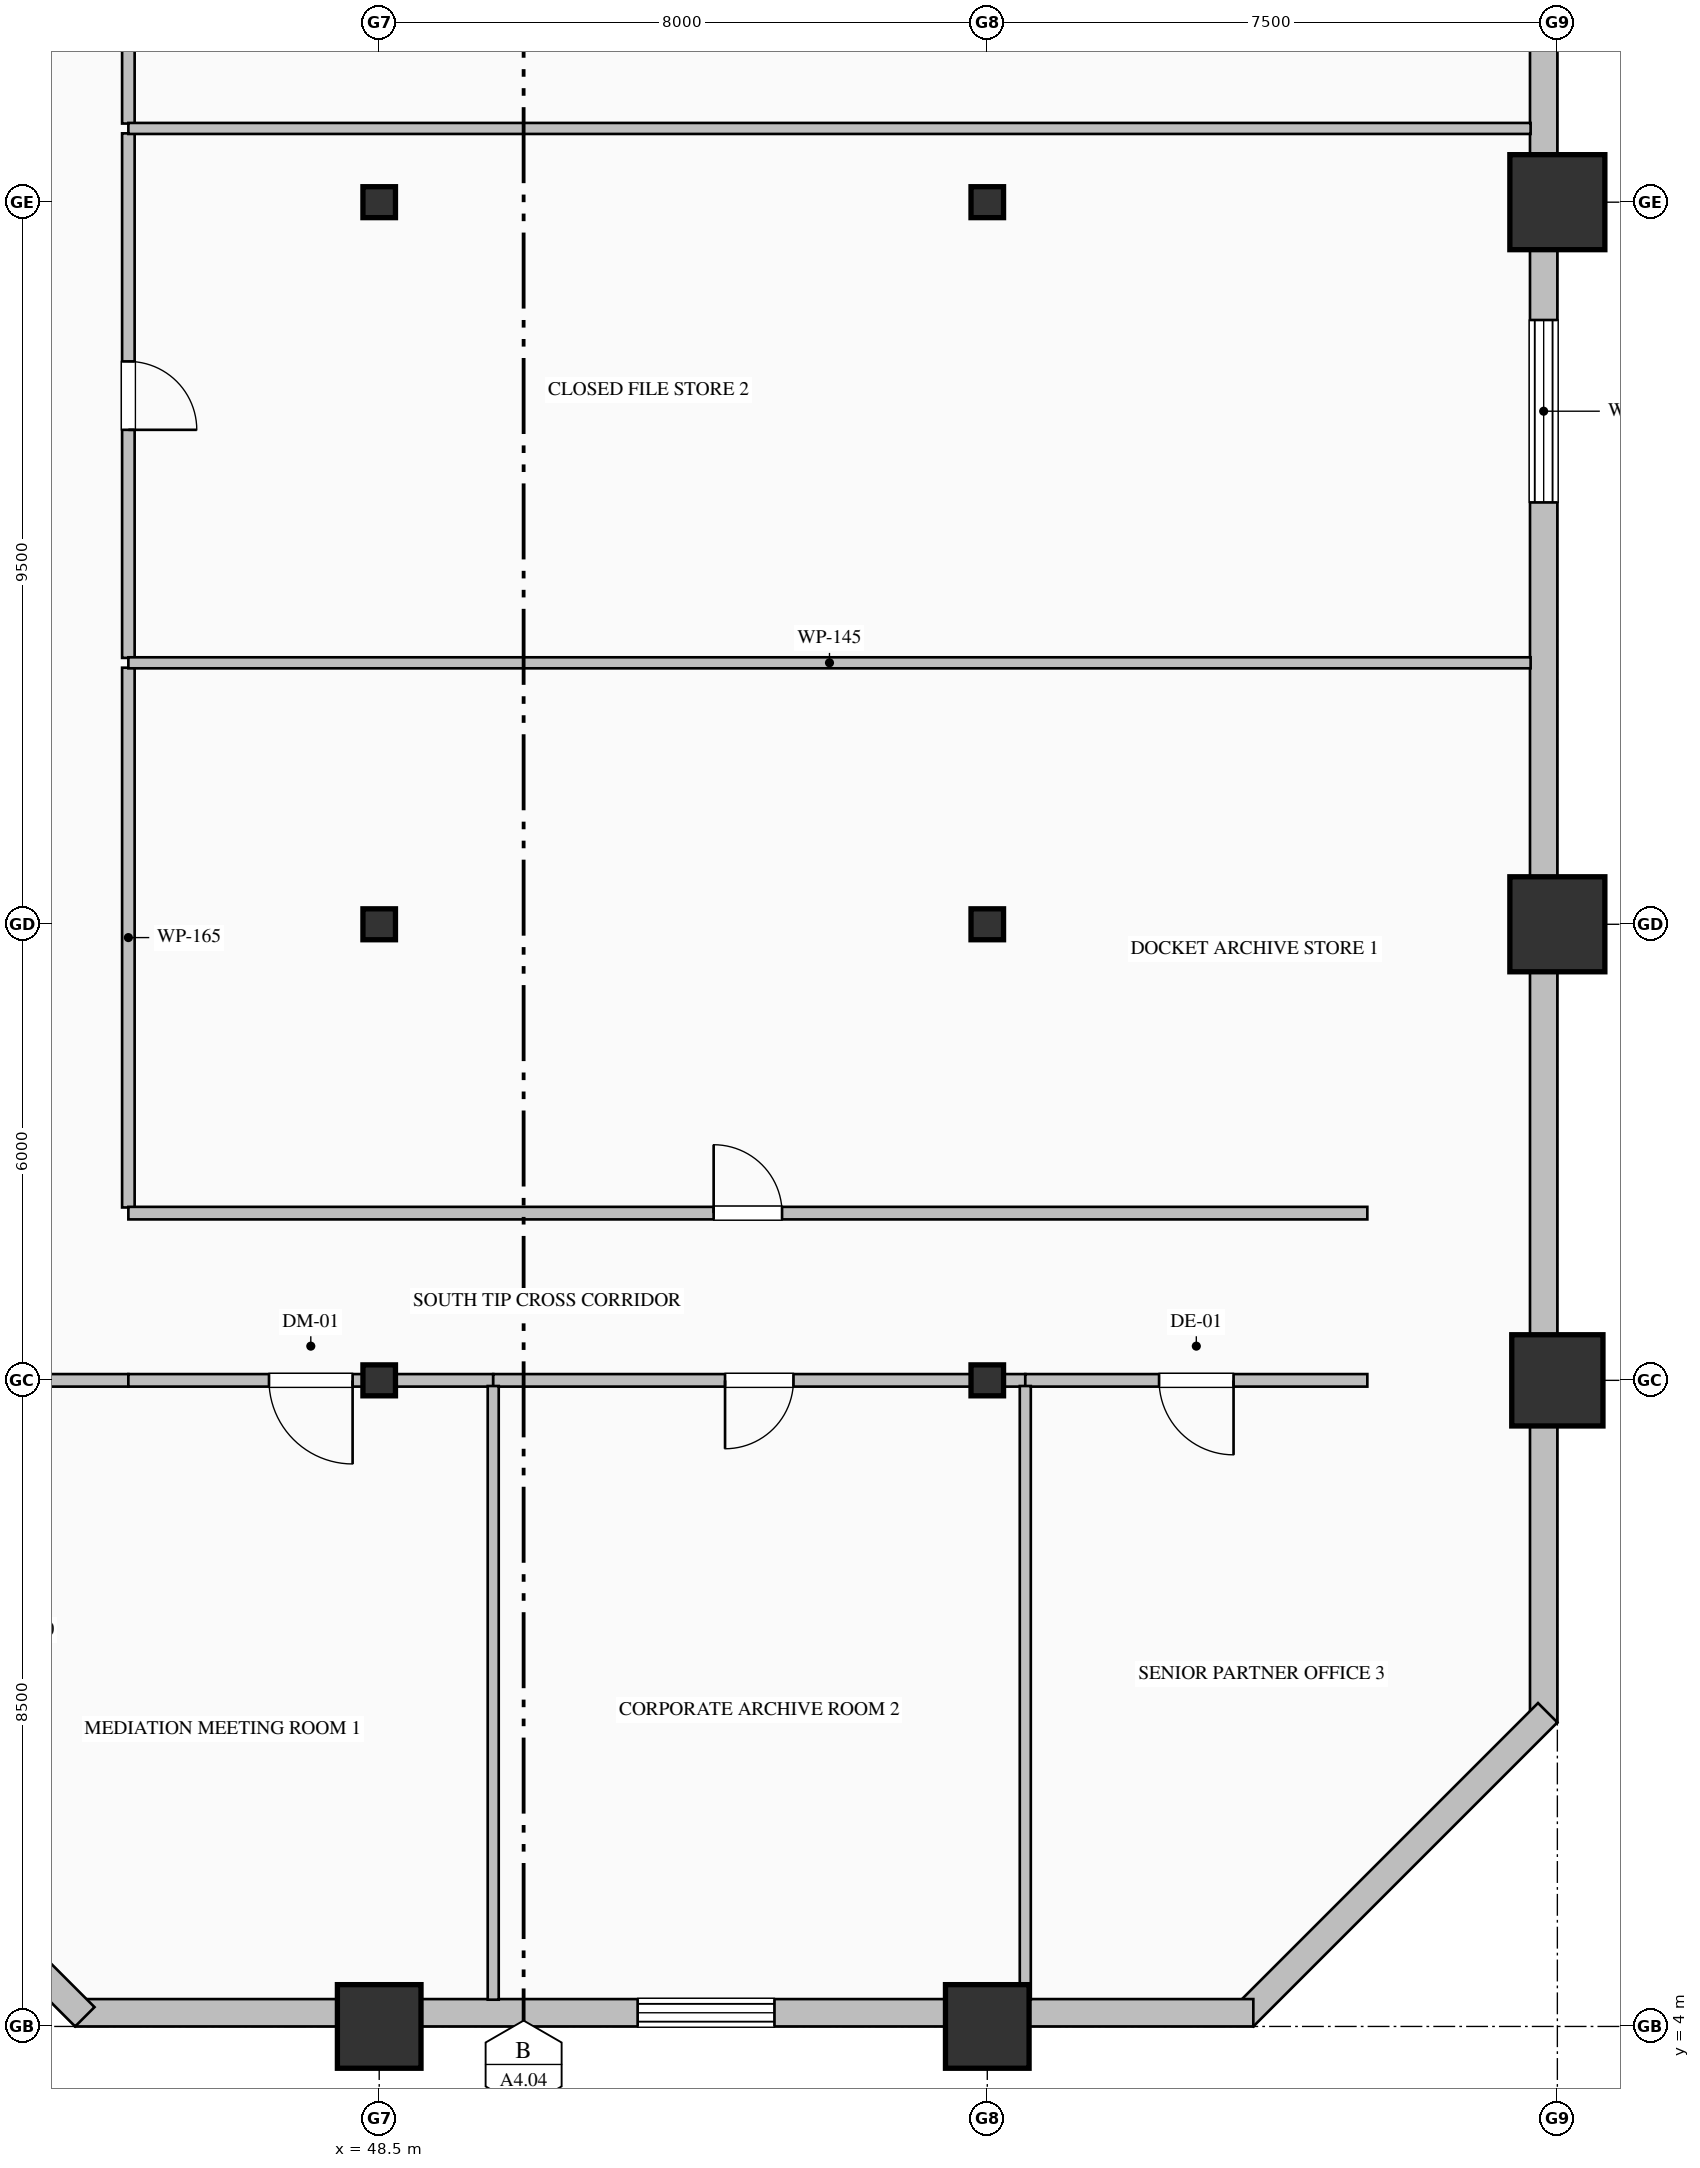
"""IFC4 building model, lengths in metres.
Left out: names, types, materials, properties, quantities, classifications, styles, units other than length and angle.
Written with IfcOpenShell. Run it as: python <this file> out.ifc"""

import sys

from ifc_helpers import new_model, si_unit, direction, frame, frame_2d, origin, origin_2d, place, context, subcontext, project, spatial, rectangle, hollow_rectangle, hollow_circle, i_section, extrude, element, fill, save


model = new_model("IFC4")
c1 = context("Model", 3, precision=1e-05, world=origin(), true_north=direction((0.0, 1.0)))
c2 = subcontext(c1, "Body", "Model", "MODEL_VIEW")
j1 = project(units=[si_unit("LENGTHUNIT", "METRE"), si_unit("PLANEANGLEUNIT", "RADIAN")], contexts=[c1])
p1 = place(None, origin())
s1 = spatial("IfcSite", under=j1, at=p1, CompositionType="ELEMENT")
p2 = place(p1, origin())
s2 = spatial("IfcBuilding", under=s1, at=p2, CompositionType="ELEMENT")
p3 = place(p2, frame((0.0, 0.0, 100.2)))
s3 = spatial("IfcBuildingStorey", under=s2, at=p3, CompositionType="ELEMENT", Elevation=100.2)
p4 = place(p3, frame((48.5, 4.0, 0.0), z_axis=(0.0, 0.0, 1.0), x_axis=(1.0, 0.0, 0.0)))
e1 = element("IfcColumn", 1, at=p4, inside=s3, PredefinedType="COLUMN", context=c2, shape_type="SweptSolid", body=[
    extrude(hollow_rectangle(XDim=1.1, YDim=1.1, WallThickness=0.04, at=origin_2d()), origin(), (0.0, 0.0, 1.0), 4.0),
])
for number, where, z_axis, x_axis in (
    (2, (48.5, 12.5, 0.0), (0.0, 0.0, 1.0), (1.0, 0.0, 0.0)),
    (3, (48.5, 18.5, 0.0), (0.0, 0.0, 1.0), (1.0, 0.0, 0.0)),
    (4, (48.5, 28.0, 0.0), (0.0, 0.0, 1.0), (1.0, 0.0, 0.0)),
):
    element("IfcColumn", number, at=place(p3, frame(where, z_axis=z_axis, x_axis=x_axis)), inside=s3, PredefinedType="COLUMN", context=c2, shape_type="SweptSolid", body=[
        extrude(i_section(OverallWidth=0.407, OverallDepth=0.428, WebThickness=0.02, FlangeThickness=0.035, FilletRadius=0.022, at=origin_2d()), origin(), (0.0, 0.0, 1.0), 4.0),
    ])
p5 = place(p3, frame((56.5, 4.0, 0.0), z_axis=(0.0, 0.0, 1.0), x_axis=(1.0, 0.0, 0.0)))
e5 = element("IfcColumn", 5, at=p5, inside=s3, PredefinedType="COLUMN", context=c2, shape_type="SweptSolid", body=[
    extrude(hollow_rectangle(XDim=1.1, YDim=1.1, WallThickness=0.04, at=origin_2d()), origin(), (0.0, 0.0, 1.0), 4.0),
])
for number, where, z_axis, x_axis in (
    (6, (56.5, 12.5, 0.0), (0.0, 0.0, 1.0), (1.0, 0.0, 0.0)),
    (7, (56.5, 18.5, 0.0), (0.0, 0.0, 1.0), (1.0, 0.0, 0.0)),
    (8, (56.5, 28.0, 0.0), (0.0, 0.0, 1.0), (1.0, 0.0, 0.0)),
):
    element("IfcColumn", number, at=place(p3, frame(where, z_axis=z_axis, x_axis=x_axis)), inside=s3, PredefinedType="COLUMN", context=c2, shape_type="SweptSolid", body=[
        extrude(i_section(OverallWidth=0.407, OverallDepth=0.428, WebThickness=0.02, FlangeThickness=0.035, FilletRadius=0.022, at=origin_2d()), origin(), (0.0, 0.0, 1.0), 4.0),
    ])
p6 = place(p3, frame((64.0, 12.5, 0.0), z_axis=(0.0, 0.0, 1.0), x_axis=(1.0, 0.0, 0.0)))
e9 = element("IfcColumn", 9, at=p6, inside=s3, PredefinedType="COLUMN", context=c2, shape_type="SweptSolid", body=[
    extrude(hollow_circle(Radius=0.6, WallThickness=0.04, at=origin_2d()), origin(), (0.0, 0.0, 1.0), 4.0),
])
for number, where, z_axis, x_axis in (
    (10, (64.0, 18.5, 0.0), (0.0, 0.0, 1.0), (1.0, 0.0, 0.0)),
    (11, (64.0, 28.0, 0.0), (0.0, 0.0, 1.0), (1.0, 0.0, 0.0)),
):
    element("IfcColumn", number, at=place(p3, frame(where, z_axis=z_axis, x_axis=x_axis)), inside=s3, PredefinedType="COLUMN", context=c2, shape_type="SweptSolid", body=[
        extrude(hollow_rectangle(XDim=1.25, YDim=1.25, WallThickness=0.045, at=origin_2d()), origin(), (0.0, 0.0, 1.0), 4.0),
    ])
p7 = place(p3, frame((63.82, 36.05, 0.0), z_axis=(0.0, 0.0, 1.0), x_axis=(0.0, -1.0, 0.0)))
e12 = element("IfcWall", 12, at=p7, inside=s3, PredefinedType="SOLIDWALL", context=c2, shape_type="SweptSolid", body=[
    extrude(rectangle(XDim=28.05, YDim=0.36, at=frame_2d((14.025, 0.0))), origin(), (0.0, 0.0, 1.0), 3.25),
])
p8 = place(p7, frame((2.7, 0.0, 0.85)))
e13 = element("IfcOpeningElement", 13, at=p8, cuts=e12, PredefinedType="OPENING", context=c2, shape_type="SweptSolid", body=[
    extrude(rectangle(XDim=1.8, YDim=2.05, at=frame_2d((0.9, 1.025))), frame((0.0, 0.19, 0.0), z_axis=(0.0, -1.0, 0.0), x_axis=(1.0, 0.0, 0.0)), (0.0, 0.0, 1.0), 0.38),
])
p9 = place(p7, frame((9.6, 0.0, 0.8)))
e14 = element("IfcOpeningElement", 14, at=p9, cuts=e12, PredefinedType="OPENING", context=c2, shape_type="SweptSolid", body=[
    extrude(rectangle(XDim=2.4, YDim=2.15, at=frame_2d((1.2, 1.075))), frame((0.0, 0.19, 0.0), z_axis=(0.0, -1.0, 0.0), x_axis=(1.0, 0.0, 0.0)), (0.0, 0.0, 1.0), 0.38),
])
p10 = place(p3, frame((63.873, 8.127, 0.0), z_axis=(0.0, 0.0, 1.0), x_axis=(-0.707106781187, -0.707106781187, 0.0)))
e15 = element("IfcWall", 15, at=p10, inside=s3, PredefinedType="SOLIDWALL", context=c2, shape_type="SweptSolid", body=[
    extrude(rectangle(XDim=5.657, YDim=0.36, at=frame_2d((2.828, 0.0))), origin(), (0.0, 0.0, 1.0), 3.75),
])
p11 = place(p3, frame((60.0, 4.18, 0.0), z_axis=(0.0, 0.0, 1.0), x_axis=(-1.0, 0.0, 0.0)))
e16 = element("IfcWall", 16, at=p11, inside=s3, PredefinedType="SOLIDWALL", context=c2, shape_type="SweptSolid", body=[
    extrude(rectangle(XDim=15.5, YDim=0.36, at=frame_2d((7.75, 0.0))), origin(), (0.0, 0.0, 1.0), 3.25),
])
p12 = place(p11, frame((6.3, 0.0, 0.85)))
e17 = element("IfcOpeningElement", 17, at=p12, cuts=e16, PredefinedType="OPENING", context=c2, shape_type="SweptSolid", body=[
    extrude(rectangle(XDim=1.8, YDim=2.05, at=frame_2d((0.9, 1.025))), frame((0.0, 0.19, 0.0), z_axis=(0.0, -1.0, 0.0), x_axis=(1.0, 0.0, 0.0)), (0.0, 0.0, 1.0), 0.38),
])
p13 = place(p3, frame((44.627, 4.127, 0.0), z_axis=(0.0, 0.0, 1.0), x_axis=(-0.707106781187, 0.707106781187, 0.0)))
e18 = element("IfcWall", 18, at=p13, inside=s3, PredefinedType="SOLIDWALL", context=c2, shape_type="SweptSolid", body=[
    extrude(rectangle(XDim=5.657, YDim=0.36, at=frame_2d((2.828, 0.0))), origin(), (0.0, 0.0, 1.0), 3.75),
])
p14 = place(p3, frame((45.2, 21.875, 0.0), z_axis=(0.0, 0.0, 1.0), x_axis=(0.0, -1.0, 0.0)))
e19 = element("IfcWall", 19, at=p14, inside=s3, PredefinedType="PARTITIONING", context=c2, shape_type="SweptSolid", body=[
    extrude(rectangle(XDim=7.101, YDim=0.165, at=frame_2d((3.551, 0.0))), origin(), (0.0, 0.0, 1.0), 3.75),
])
p15 = place(p3, frame((45.2, 28.906, 0.0), z_axis=(0.0, 0.0, 1.0), x_axis=(0.0, -1.0, 0.0)))
e20 = element("IfcWall", 20, at=p15, inside=s3, PredefinedType="PARTITIONING", context=c2, shape_type="SweptSolid", body=[
    extrude(rectangle(XDim=6.901, YDim=0.165, at=frame_2d((3.451, 0.0))), origin(), (0.0, 0.0, 1.0), 3.75),
])
p16 = place(p15, frame((3.0, 0.0, 0.0)))
e21 = element("IfcOpeningElement", 21, at=p16, cuts=e20, PredefinedType="OPENING", context=c2, shape_type="SweptSolid", body=[
    extrude(rectangle(XDim=0.9, YDim=2.15, at=frame_2d((0.45, 1.075))), frame((0.0, 0.093, 0.0), z_axis=(0.0, -1.0, 0.0), x_axis=(1.0, 0.0, 0.0)), (0.0, 0.0, 1.0), 0.185),
])
p17 = place(p3, frame((45.2, 31.525, 0.0), z_axis=(0.0, 0.0, 1.0), x_axis=(0.0, -1.0, 0.0)))
e22 = element("IfcWall", 22, at=p17, inside=s3, PredefinedType="PARTITIONING", context=c2, shape_type="SweptSolid", body=[
    extrude(rectangle(XDim=2.491, YDim=0.165, at=frame_2d((1.246, 0.0))), origin(), (0.0, 0.0, 1.0), 3.75),
])
p18 = place(p3, frame((45.2, 12.5, 0.0), z_axis=(0.0, 0.0, 1.0), x_axis=(-1.0, 0.0, 0.0)))
e23 = element("IfcWall", 23, at=p18, inside=s3, PredefinedType="PARTITIONING", context=c2, shape_type="SweptSolid", body=[
    extrude(rectangle(XDim=2.2, YDim=0.165, at=frame_2d((1.1, 0.0))), origin(), (0.0, 0.0, 1.0), 3.042),
])
p19 = place(p3, frame((45.2, 14.7, 0.0), z_axis=(0.0, 0.0, 1.0), x_axis=(1.0, 0.0, 0.0)))
e24 = element("IfcWall", 24, at=p19, inside=s3, PredefinedType="PARTITIONING", context=c2, shape_type="SweptSolid", body=[
    extrude(rectangle(XDim=16.3, YDim=0.165, at=frame_2d((8.15, 0.0))), origin(), (0.0, 0.0, 1.0), 3.75),
])
p20 = place(p19, frame((7.7, 0.0, 0.0)))
e25 = element("IfcOpeningElement", 25, at=p20, cuts=e24, PredefinedType="OPENING", context=c2, shape_type="SweptSolid", body=[
    extrude(rectangle(XDim=0.9, YDim=2.15, at=frame_2d((0.45, 1.075))), frame((0.0, 0.093, 0.0), z_axis=(0.0, -1.0, 0.0), x_axis=(1.0, 0.0, 0.0)), (0.0, 0.0, 1.0), 0.185),
])
p21 = place(p3, frame((50.0, 12.5, 0.0), z_axis=(0.0, 0.0, 1.0), x_axis=(-1.0, 0.0, 0.0)))
e26 = element("IfcWall", 26, at=p21, inside=s3, PredefinedType="PARTITIONING", context=c2, shape_type="SweptSolid", body=[
    extrude(rectangle(XDim=4.8, YDim=0.165, at=frame_2d((2.4, 0.0))), origin(), (0.0, 0.0, 1.0), 3.042),
])
p22 = place(p21, frame((1.85, 0.0, 0.0)))
e27 = element("IfcOpeningElement", 27, at=p22, cuts=e26, PredefinedType="OPENING", context=c2, shape_type="SweptSolid", body=[
    extrude(rectangle(XDim=1.1, YDim=2.2, at=frame_2d((0.55, 1.1))), frame((0.0, 0.093, 0.0), z_axis=(0.0, -1.0, 0.0), x_axis=(1.0, 0.0, 0.0)), (0.0, 0.0, 1.0), 0.185),
])
p23 = place(p3, frame((57.0, 12.5, 0.0), z_axis=(0.0, 0.0, 1.0), x_axis=(-1.0, 0.0, 0.0)))
e28 = element("IfcWall", 28, at=p23, inside=s3, PredefinedType="PARTITIONING", context=c2, shape_type="SweptSolid", body=[
    extrude(rectangle(XDim=7.0, YDim=0.165, at=frame_2d((3.5, 0.0))), origin(), (0.0, 0.0, 1.0), 3.042),
])
p24 = place(p23, frame((3.05, 0.0, 0.0)))
e29 = element("IfcOpeningElement", 29, at=p24, cuts=e28, PredefinedType="OPENING", context=c2, shape_type="SweptSolid", body=[
    extrude(rectangle(XDim=0.9, YDim=2.15, at=frame_2d((0.45, 1.075))), frame((0.0, 0.093, 0.0), z_axis=(0.0, -1.0, 0.0), x_axis=(1.0, 0.0, 0.0)), (0.0, 0.0, 1.0), 0.185),
])
p25 = place(p3, frame((61.5, 12.5, 0.0), z_axis=(0.0, 0.0, 1.0), x_axis=(-1.0, 0.0, 0.0)))
e30 = element("IfcWall", 30, at=p25, inside=s3, PredefinedType="PARTITIONING", context=c2, shape_type="SweptSolid", body=[
    extrude(rectangle(XDim=4.5, YDim=0.165, at=frame_2d((2.25, 0.0))), origin(), (0.0, 0.0, 1.0), 3.042),
])
p26 = place(p25, frame((1.76, 0.0, 0.0)))
e31 = element("IfcOpeningElement", 31, at=p26, cuts=e30, PredefinedType="OPENING", context=c2, shape_type="SweptSolid", body=[
    extrude(rectangle(XDim=0.98, YDim=2.25, at=frame_2d((0.49, 1.125))), frame((0.0, 0.093, 0.0), z_axis=(0.0, -1.0, 0.0), x_axis=(1.0, 0.0, 0.0)), (0.0, 0.0, 1.0), 0.185),
])
for number, where, z_axis, x_axis in (
    (32, (45.2, 21.94, 0.0), (0.0, 0.0, 1.0), (1.0, 0.0, 0.0)),
    (33, (45.2, 28.97, 0.0), (0.0, 0.0, 1.0), (1.0, 0.0, 0.0)),
):
    element("IfcWall", number, at=place(p3, frame(where, z_axis=z_axis, x_axis=x_axis)), inside=s3, PredefinedType="PARTITIONING", context=c2, shape_type="SweptSolid", body=[
        extrude(rectangle(XDim=18.448, YDim=0.145, at=frame_2d((9.224, 0.0))), origin(), (0.0, 0.0, 1.0), 3.75),
    ])
for number, where, z_axis, x_axis in (
    (34, (50.0, 12.426, 0.0), (0.0, 0.0, 1.0), (0.0, -1.0, 0.0)),
    (35, (57.0, 12.426, 0.0), (0.0, 0.0, 1.0), (0.0, -1.0, 0.0)),
):
    element("IfcWall", number, at=place(p3, frame(where, z_axis=z_axis, x_axis=x_axis)), inside=s3, PredefinedType="PARTITIONING", context=c2, shape_type="SweptSolid", body=[
        extrude(rectangle(XDim=8.073, YDim=0.145, at=frame_2d((4.037, 0.0))), origin(), (0.0, 0.0, 1.0), 3.75),
    ])
p27 = place(p9, origin())
e36 = element("IfcWindow", 36, at=p27, inside=s3, PartitioningType="TRIPLE_PANEL_VERTICAL", PredefinedType="WINDOW", context=c2, shape_type="SweptSolid", body=[
    extrude(rectangle(XDim=2.4, YDim=2.15, at=frame_2d((1.2, 1.075))), frame((0.0, 0.15, 0.0), z_axis=(0.0, -1.0, 0.0), x_axis=(1.0, 0.0, 0.0)), (0.0, 0.0, 1.0), 0.06),
])
fill(e14, e36)
p28 = place(p12, origin())
e37 = element("IfcWindow", 37, at=p28, inside=s3, PartitioningType="TRIPLE_PANEL_VERTICAL", PredefinedType="WINDOW", context=c2, shape_type="SweptSolid", body=[
    extrude(rectangle(XDim=1.8, YDim=2.05, at=frame_2d((0.9, 1.025))), frame((0.0, 0.15, 0.0), z_axis=(0.0, -1.0, 0.0), x_axis=(1.0, 0.0, 0.0)), (0.0, 0.0, 1.0), 0.06),
])
fill(e17, e37)
p29 = place(p20, origin())
e38 = element("IfcDoor", 38, at=p29, inside=s3, OperationType="SINGLE_SWING_LEFT", PredefinedType="DOOR", context=c2, shape_type="SweptSolid", body=[
    extrude(rectangle(XDim=0.9, YDim=2.15, at=frame_2d((0.45, 1.075))), frame((0.0, 0.025, 0.0), z_axis=(0.0, -1.0, 0.0), x_axis=(1.0, 0.0, 0.0)), (0.0, 0.0, 1.0), 0.05),
])
fill(e25, e38)
p30 = place(p16, origin())
e39 = element("IfcDoor", 39, at=p30, inside=s3, OperationType="SINGLE_SWING_RIGHT", PredefinedType="DOOR", context=c2, shape_type="SweptSolid", body=[
    extrude(rectangle(XDim=0.9, YDim=2.15, at=frame_2d((0.45, 1.075))), frame((0.0, 0.025, 0.0), z_axis=(0.0, -1.0, 0.0), x_axis=(1.0, 0.0, 0.0)), (0.0, 0.0, 1.0), 0.05),
])
fill(e21, e39)
p31 = place(p22, origin())
e40 = element("IfcDoor", 40, at=p31, inside=s3, OperationType="SINGLE_SWING_LEFT", PredefinedType="DOOR", context=c2, shape_type="SweptSolid", body=[
    extrude(rectangle(XDim=1.1, YDim=2.2, at=frame_2d((0.55, 1.1))), frame((0.0, 0.025, 0.0), z_axis=(0.0, -1.0, 0.0), x_axis=(1.0, 0.0, 0.0)), (0.0, 0.0, 1.0), 0.05),
])
fill(e27, e40)
p32 = place(p24, origin())
e41 = element("IfcDoor", 41, at=p32, inside=s3, OperationType="SINGLE_SWING_RIGHT", PredefinedType="DOOR", context=c2, shape_type="SweptSolid", body=[
    extrude(rectangle(XDim=0.9, YDim=2.15, at=frame_2d((0.45, 1.075))), frame((0.0, 0.025, 0.0), z_axis=(0.0, -1.0, 0.0), x_axis=(1.0, 0.0, 0.0)), (0.0, 0.0, 1.0), 0.05),
])
fill(e29, e41)
p33 = place(p26, origin())
e42 = element("IfcDoor", 42, at=p33, inside=s3, OperationType="SINGLE_SWING_LEFT", PredefinedType="DOOR", context=c2, shape_type="SweptSolid", body=[
    extrude(rectangle(XDim=0.98, YDim=2.25, at=frame_2d((0.49, 1.125))), frame((0.0, 0.025, 0.0), z_axis=(0.0, -1.0, 0.0), x_axis=(1.0, 0.0, 0.0)), (0.0, 0.0, 1.0), 0.05),
])
fill(e31, e42)
save(model, sys.argv[1])
